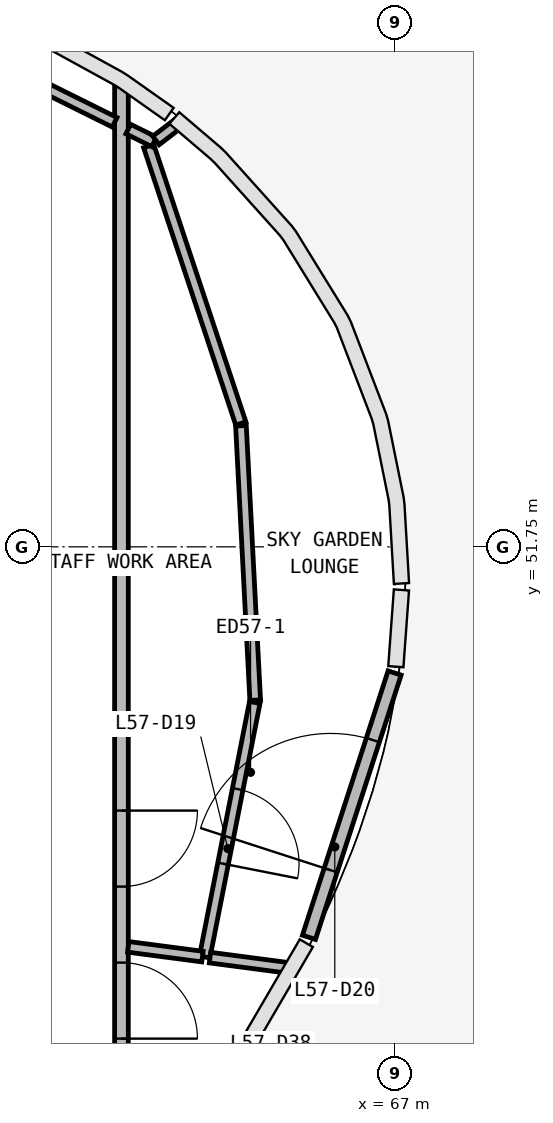
"""IFC4 building model, lengths in metres.
Left out: names, types, materials, properties, quantities, classifications, styles, units other than length and angle.
Written with IfcOpenShell. Run it as: python <this file> out.ifc"""

import sys

from ifc_helpers import new_model, si_unit, direction, frame, frame_2d, origin, place, context, subcontext, project, spatial, rectangle, extrude, source, transform, mapped, element, fill, save


model = new_model("IFC4")
c1 = context("Model", 3, precision=1e-05, world=origin(), true_north=direction((0.0, 1.0)))
c2 = subcontext(c1, "Body", "Model", "MODEL_VIEW")
j1 = project(units=[si_unit("LENGTHUNIT", "METRE"), si_unit("PLANEANGLEUNIT", "RADIAN")], contexts=[c1])
p1 = place(None, origin())
s1 = spatial("IfcSite", under=j1, at=p1, CompositionType="ELEMENT")
p2 = place(p1, origin())
s2 = spatial("IfcBuilding", under=s1, at=p2, CompositionType="ELEMENT")
p3 = place(p2, frame((0.0, 0.0, 234.5)))
s3 = spatial("IfcBuildingStorey", under=s2, at=p3, CompositionType="ELEMENT", Elevation=234.5)
p4 = place(p3, frame((65.867, 46.613, 0.0), z_axis=(0.0, 0.0, 1.0), x_axis=(0.308262986163, 0.951301178051, 0.0)))
e1 = element("IfcWall", 1, at=p4, inside=s3, PredefinedType="STANDARD", context=c2, shape_type="SweptSolid", body=[
    extrude(rectangle(XDim=3.656, YDim=0.18, at=frame_2d((1.828, 0.0))), origin(), (0.0, 0.0, 1.0), 3.126),
])
p5 = place(p4, frame((0.928, 0.0, 0.0)))
e2 = element("IfcOpeningElement", 2, at=p5, cuts=e1, PredefinedType="OPENING", context=c2, shape_type="SweptSolid", body=[
    extrude(rectangle(XDim=1.8, YDim=2.4, at=frame_2d((0.9, 1.2))), frame((0.0, 0.1, 0.0), z_axis=(0.0, -1.0, 0.0), x_axis=(1.0, 0.0, 0.0)), (0.0, 0.0, 1.0), 0.2),
])
p6 = place(p3, frame((63.4, 57.812, 0.0), z_axis=(0.0, 0.0, 1.0), x_axis=(0.0, -1.0, 0.0)))
e3 = element("IfcWall", 3, at=p6, inside=s3, PredefinedType="PARTITIONING", context=c2, shape_type="SweptSolid", body=[
    extrude(rectangle(XDim=20.182, YDim=0.18, at=frame_2d((10.091, 0.0))), origin(), (0.0, 0.0, 1.0), 2.88),
])
p7 = place(p6, frame((9.532, 0.0, 0.0)))
e4 = element("IfcOpeningElement", 4, at=p7, cuts=e3, PredefinedType="OPENING", context=c2, shape_type="SweptSolid", body=[
    extrude(rectangle(XDim=1.0, YDim=2.1, at=frame_2d((0.5, 1.05))), frame((0.0, 0.1, 0.0), z_axis=(0.0, -1.0, 0.0), x_axis=(1.0, 0.0, 0.0)), (0.0, 0.0, 1.0), 0.2),
])
p8 = place(p6, frame((11.532, 0.0, 0.0)))
e5 = element("IfcOpeningElement", 5, at=p8, cuts=e3, PredefinedType="OPENING", context=c2, shape_type="SweptSolid", body=[
    extrude(rectangle(XDim=1.0, YDim=2.1, at=frame_2d((0.5, 1.05))), frame((0.0, 0.1, 0.0), z_axis=(0.0, -1.0, 0.0), x_axis=(1.0, 0.0, 0.0)), (0.0, 0.0, 1.0), 0.2),
])
p9 = place(p3, frame((64.971, 53.373, 0.0), z_axis=(0.0, 0.0, 1.0), x_axis=(-0.315237319433, 0.94901287264, 0.0)))
e6 = element("IfcWall", 6, at=p9, inside=s3, PredefinedType="PARTITIONING", context=c2, shape_type="SweptSolid", body=[
    extrude(rectangle(XDim=3.846, YDim=0.14, at=frame_2d((1.923, 0.0))), origin(), (0.0, 0.0, 1.0), 2.88),
])
p10 = place(p3, frame((65.16, 49.732, 0.0), z_axis=(0.0, 0.0, 1.0), x_axis=(-0.051931454633, 0.998650651639, 0.0)))
e7 = element("IfcWall", 7, at=p10, inside=s3, PredefinedType="PARTITIONING", context=c2, shape_type="SweptSolid", body=[
    extrude(rectangle(XDim=3.615, YDim=0.14, at=frame_2d((1.808, 0.0))), origin(), (0.0, 0.0, 1.0), 2.88),
])
p11 = place(p3, frame((65.154, 49.703, 0.0), z_axis=(0.0, 0.0, 1.0), x_axis=(-0.193102031635, -0.981178681677, 0.0)))
e8 = element("IfcWall", 8, at=p11, inside=s3, PredefinedType="PARTITIONING", context=c2, shape_type="SweptSolid", body=[
    extrude(rectangle(XDim=3.412, YDim=0.14, at=frame_2d((1.706, 0.0))), origin(), (0.0, 0.0, 1.0), 2.88),
])
p12 = place(p11, frame((1.162, 0.0, 0.0)))
e9 = element("IfcOpeningElement", 9, at=p12, cuts=e8, PredefinedType="OPENING", context=c2, shape_type="SweptSolid", body=[
    extrude(rectangle(XDim=1.0, YDim=2.1, at=frame_2d((0.5, 1.05))), frame((0.0, 0.08, 0.0), z_axis=(0.0, -1.0, 0.0), x_axis=(1.0, 0.0, 0.0)), (0.0, 0.0, 1.0), 0.16),
])
p13 = place(p3, frame((63.31, 57.335, 0.0), z_axis=(0.0, 0.0, 1.0), x_axis=(-0.895715462777, 0.444627720394, 0.0)))
e10 = element("IfcWall", 10, at=p13, inside=s3, PredefinedType="PARTITIONING", context=c2, shape_type="SweptSolid", body=[
    extrude(rectangle(XDim=2.192, YDim=0.14, at=frame_2d((1.096, 0.0))), origin(), (0.0, 0.0, 1.0), 2.88),
])
p14 = place(p3, frame((63.49, 46.487, 0.0), z_axis=(0.0, 0.0, 1.0), x_axis=(0.991447538325, -0.130505857147, 0.0)))
e11 = element("IfcWall", 11, at=p14, inside=s3, PredefinedType="PARTITIONING", context=c2, shape_type="SweptSolid", body=[
    extrude(rectangle(XDim=0.984, YDim=0.14, at=frame_2d((0.492, 0.0))), origin(), (0.0, 0.0, 1.0), 2.88),
])
p15 = place(p3, frame((64.565, 46.346, 0.0), z_axis=(0.0, 0.0, 1.0), x_axis=(0.991447064532, -0.130509456483, 0.0)))
e12 = element("IfcWall", 12, at=p15, inside=s3, PredefinedType="PARTITIONING", context=c2, shape_type="SweptSolid", body=[
    extrude(rectangle(XDim=1.034, YDim=0.14, at=frame_2d((0.517, 0.0))), origin(), (0.0, 0.0, 1.0), 2.88),
])
p16 = place(p3, frame((63.83, 57.077, 0.0), z_axis=(0.0, 0.0, 1.0), x_axis=(-0.895837533814, 0.444381719932, 0.0)))
e13 = element("IfcWall", 13, at=p16, inside=s3, PredefinedType="PARTITIONING", context=c2, shape_type="SweptSolid", body=[
    extrude(rectangle(XDim=0.38, YDim=0.14, at=frame_2d((0.19, 0.0))), origin(), (0.0, 0.0, 1.0), 2.88),
])
p17 = place(p3, frame((63.854, 57.096, 0.0), z_axis=(0.0, 0.0, 1.0), x_axis=(0.793499623352, 0.608570741772, 0.0)))
e14 = element("IfcWall", 14, at=p17, inside=s3, PredefinedType="PARTITIONING", context=c2, shape_type="SweptSolid", body=[
    extrude(rectangle(XDim=0.331, YDim=0.14, at=frame_2d((0.166, 0.0))), origin(), (0.0, 0.0, 1.0), 2.88),
])
m1 = source(origin(), c2, "Body", "SweptSolid", [
    extrude(rectangle(XDim=1.8, YDim=2.4, at=frame_2d((0.9, 1.2))), frame((0.0, 0.025, 0.0), z_axis=(0.0, -1.0, 0.0), x_axis=(1.0, 0.0, 0.0)), (0.0, 0.0, 1.0), 0.05),
])
p18 = place(p5, origin())
e15 = element("IfcDoor", 15, at=p18, inside=s3, OperationType="DOUBLE_DOOR_SINGLE_SWING", PredefinedType="DOOR", context=c2, shape_type="MappedRepresentation", body=[
    mapped(m1, transform((0.0, 0.0, 0.0), scale=1.0)),
])
fill(e2, e15)
m2 = source(origin(), c2, "Body", "SweptSolid", [
    extrude(rectangle(XDim=1.0, YDim=2.1, at=frame_2d((0.5, 1.05))), frame((0.0, 0.025, 0.0), z_axis=(0.0, -1.0, 0.0), x_axis=(1.0, 0.0, 0.0)), (0.0, 0.0, 1.0), 0.05),
])
p19 = place(p7, origin())
e16 = element("IfcDoor", 16, at=p19, inside=s3, OperationType="SINGLE_SWING_LEFT", PredefinedType="DOOR", context=c2, shape_type="MappedRepresentation", body=[
    mapped(m2, transform((0.0, 0.0, 0.0), scale=1.0)),
])
fill(e4, e16)
p20 = place(p12, origin())
e17 = element("IfcDoor", 17, at=p20, inside=s3, OperationType="SINGLE_SWING_RIGHT", PredefinedType="DOOR", context=c2, shape_type="MappedRepresentation", body=[
    mapped(m2, transform((0.0, 0.0, 0.0), scale=1.0)),
])
fill(e9, e17)
p21 = place(p8, origin())
e18 = element("IfcDoor", 18, at=p21, inside=s3, OperationType="SINGLE_SWING_RIGHT", PredefinedType="DOOR", context=c2, shape_type="MappedRepresentation", body=[
    mapped(m2, transform((0.0, 0.0, 0.0), scale=1.0)),
])
fill(e5, e18)
save(model, sys.argv[1])
